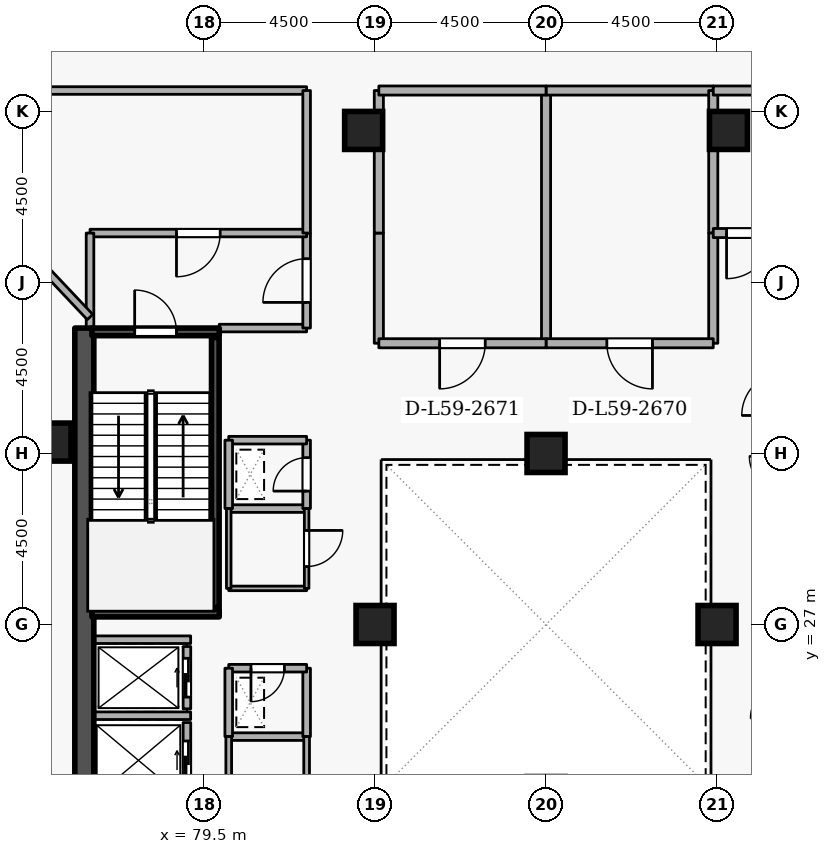
"""IFC4 building model, lengths in metres.
Left out: names, types, materials, properties, quantities, classifications, styles, units other than length and angle.
Written with IfcOpenShell. Run it as: python <this file> out.ifc"""

import sys

from ifc_helpers import new_model, si_unit, direction, frame, frame_2d, origin, origin_2d, place, context, subcontext, project, spatial, rectangle, extrude, element, fill, save


model = new_model("IFC4")
c1 = context("Model", 3, precision=1e-05, world=origin(), true_north=direction((0.0, 1.0)))
c2 = subcontext(c1, "Body", "Model", "MODEL_VIEW")
j1 = project(units=[si_unit("LENGTHUNIT", "METRE"), si_unit("PLANEANGLEUNIT", "RADIAN")], contexts=[c1])
p1 = place(None, origin())
s1 = spatial("IfcSite", under=j1, at=p1, CompositionType="ELEMENT")
p2 = place(p1, origin())
s2 = spatial("IfcBuilding", under=s1, at=p2, CompositionType="ELEMENT")
p3 = place(p2, frame((0.0, 0.0, 221.7)))
s3 = spatial("IfcBuildingStorey", under=s2, at=p3, CompositionType="ELEMENT", Elevation=221.7)
p4 = place(p3, frame((76.35, 19.2, 0.0), z_axis=(0.0, 0.0, 1.0), x_axis=(0.0, 1.0, 0.0)))
e1 = element("IfcWall", 1, at=p4, inside=s3, PredefinedType="SHEAR", context=c2, shape_type="SweptSolid", body=[
    extrude(rectangle(XDim=15.6, YDim=0.5, at=frame_2d((7.8, 0.0))), origin(), (0.0, 0.0, 1.0), 4.2),
])
for number, where, z_axis, x_axis in (
    (2, (93.3, 40.0, 0.0), (0.0, 0.0, 1.0), (1.0, 0.0, 0.0)),
    (3, (83.7, 40.0, 0.0), (0.0, 0.0, 1.0), (1.0, 0.0, 0.0)),
    (4, (75.5, 31.8, 0.0), (0.0, 0.0, 1.0), (1.0, 0.0, 0.0)),
    (5, (93.0, 27.0, 0.0), (0.0, 0.0, 1.0), (1.0, 0.0, 0.0)),
    (6, (84.0, 27.0, 0.0), (0.0, 0.0, 1.0), (1.0, 0.0, 0.0)),
    (7, (88.5, 31.5, 0.0), (0.0, 0.0, 1.0), (1.0, 0.0, 0.0)),
):
    element("IfcColumn", number, at=place(p3, frame(where, z_axis=z_axis, x_axis=x_axis)), inside=s3, PredefinedType="COLUMN", context=c2, shape_type="SweptSolid", body=[
        extrude(rectangle(XDim=1.0, YDim=1.0, at=origin_2d()), origin(), (0.0, 0.0, 1.0), 4.2),
    ])
p5 = place(p3, frame((79.05, 24.78, 0.0), z_axis=(0.0, 0.0, 1.0), x_axis=(0.0, 1.0, 0.0)))
e8 = element("IfcWall", 8, at=p5, inside=s3, PredefinedType="STANDARD", context=c2, shape_type="SweptSolid", body=[
    extrude(rectangle(XDim=1.64, YDim=0.2, at=frame_2d((0.82, 0.0))), origin(), (0.0, 0.0, 1.0), 3.94),
])
p6 = place(p5, frame((0.31, 0.0, 0.0)))
e9 = element("IfcOpeningElement", 9, at=p6, cuts=e8, PredefinedType="OPENING", context=c2, shape_type="SweptSolid", body=[
    extrude(rectangle(XDim=1.02, YDim=2.06, at=frame_2d((0.51, 1.03))), frame((0.0, 0.11, 0.0), z_axis=(0.0, -1.0, 0.0), x_axis=(1.0, 0.0, 0.0)), (0.0, 0.0, 1.0), 0.22),
])
p7 = place(p3, frame((79.05, 22.43, 0.0), z_axis=(0.0, 0.0, 1.0), x_axis=(0.0, 1.0, 0.0)))
e10 = element("IfcWall", 10, at=p7, inside=s3, PredefinedType="STANDARD", context=c2, shape_type="SweptSolid", body=[
    extrude(rectangle(XDim=1.99, YDim=0.2, at=frame_2d((0.995, 0.0))), origin(), (0.0, 0.0, 1.0), 3.94),
])
p8 = place(p7, frame((0.485, 0.0, 0.0)))
e11 = element("IfcOpeningElement", 11, at=p8, cuts=e10, PredefinedType="OPENING", context=c2, shape_type="SweptSolid", body=[
    extrude(rectangle(XDim=1.02, YDim=2.06, at=frame_2d((0.51, 1.03))), frame((0.0, 0.11, 0.0), z_axis=(0.0, -1.0, 0.0), x_axis=(1.0, 0.0, 0.0)), (0.0, 0.0, 1.0), 0.22),
])
for number, where, z_axis, x_axis in (
    (12, (76.612, 26.6, 0.0), (0.0, 0.0, 1.0), (1.0, 0.0, 0.0)),
    (13, (76.612, 24.6, 0.0), (0.0, 0.0, 1.0), (1.0, 0.0, 0.0)),
):
    element("IfcWall", number, at=place(p3, frame(where, z_axis=z_axis, x_axis=x_axis)), inside=s3, PredefinedType="STANDARD", context=c2, shape_type="SweptSolid", body=[
        extrude(rectangle(XDim=2.536, YDim=0.2, at=frame_2d((1.268, 0.0))), origin(), (0.0, 0.0, 1.0), 3.94),
    ])
p9 = place(p3, frame((76.55, 34.7, 0.0), z_axis=(0.0, 0.0, 1.0), x_axis=(1.0, 0.0, 0.0)))
e14 = element("IfcWall", 14, at=p9, inside=s3, PredefinedType="SHEAR", context=c2, shape_type="SweptSolid", body=[
    extrude(rectangle(XDim=3.35, YDim=0.2, at=frame_2d((1.675, 0.0))), origin(), (0.0, 0.0, 1.0), 4.2),
])
p10 = place(p9, frame((1.125, 0.0, 0.0)))
e15 = element("IfcOpeningElement", 15, at=p10, cuts=e14, PredefinedType="OPENING", context=c2, shape_type="SweptSolid", body=[
    extrude(rectangle(XDim=1.1, YDim=2.1, at=frame_2d((0.55, 1.05))), frame((0.0, 0.11, 0.0), z_axis=(0.0, -1.0, 0.0), x_axis=(1.0, 0.0, 0.0)), (0.0, 0.0, 1.0), 0.22),
])
p11 = place(p3, frame((79.9, 27.3, 0.0), z_axis=(0.0, 0.0, 1.0), x_axis=(-1.0, 0.0, 0.0)))
e16 = element("IfcWall", 16, at=p11, inside=s3, PredefinedType="SHEAR", context=c2, shape_type="SweptSolid", body=[
    extrude(rectangle(XDim=3.35, YDim=0.2, at=frame_2d((1.675, 0.0))), origin(), (0.0, 0.0, 1.0), 4.2),
])
p12 = place(p3, frame((79.797, 27.45, 0.0), z_axis=(0.0, 0.0, 1.0), x_axis=(0.0, 1.0, 0.0)))
e17 = element("IfcWall", 17, at=p12, inside=s3, PredefinedType="SHEAR", context=c2, shape_type="SweptSolid", body=[
    extrude(rectangle(XDim=7.1, YDim=0.2, at=frame_2d((3.55, 0.0))), origin(), (0.0, 0.0, 1.0), 4.2),
])
p13 = place(p3, frame((79.9, 34.8, 0.0), z_axis=(0.0, 0.0, 1.0), x_axis=(1.0, 0.0, 0.0)))
e18 = element("IfcWall", 18, at=p13, inside=s3, PredefinedType="STANDARD", context=c2, shape_type="SweptSolid", body=[
    extrude(rectangle(XDim=2.3, YDim=0.2, at=frame_2d((1.15, 0.0))), origin(), (0.0, 0.0, 1.0), 3.145),
])
p14 = place(p3, frame((82.2, 34.8, 0.0), z_axis=(0.0, 0.0, 1.0), x_axis=(0.0, 1.0, 0.0)))
e19 = element("IfcWall", 19, at=p14, inside=s3, PredefinedType="STANDARD", context=c2, shape_type="SweptSolid", body=[
    extrude(rectangle(XDim=2.5, YDim=0.2, at=frame_2d((1.25, 0.0))), origin(), (0.0, 0.0, 1.0), 3.94),
])
p15 = place(p14, frame((0.675, 0.0, 0.0)))
e20 = element("IfcOpeningElement", 20, at=p15, cuts=e19, PredefinedType="OPENING", context=c2, shape_type="SweptSolid", body=[
    extrude(rectangle(XDim=1.15, YDim=2.1, at=frame_2d((0.575, 1.05))), frame((0.0, 0.11, 0.0), z_axis=(0.0, -1.0, 0.0), x_axis=(1.0, 0.0, 0.0)), (0.0, 0.0, 1.0), 0.22),
])
p16 = place(p3, frame((82.2, 37.3, 0.0), z_axis=(0.0, 0.0, 1.0), x_axis=(-1.0, 0.0, 0.0)))
e21 = element("IfcWall", 21, at=p16, inside=s3, PredefinedType="STANDARD", context=c2, shape_type="SweptSolid", body=[
    extrude(rectangle(XDim=5.7, YDim=0.2, at=frame_2d((2.85, 0.0))), origin(), (0.0, 0.0, 1.0), 3.94),
])
p17 = place(p16, frame((2.275, 0.0, 0.0)))
e22 = element("IfcOpeningElement", 22, at=p17, cuts=e21, PredefinedType="OPENING", context=c2, shape_type="SweptSolid", body=[
    extrude(rectangle(XDim=1.15, YDim=2.1, at=frame_2d((0.575, 1.05))), frame((0.0, 0.11, 0.0), z_axis=(0.0, -1.0, 0.0), x_axis=(1.0, 0.0, 0.0)), (0.0, 0.0, 1.0), 0.22),
])
p18 = place(p3, frame((76.5, 37.3, 0.0), z_axis=(0.0, 0.0, 1.0), x_axis=(0.0, -1.0, 0.0)))
e23 = element("IfcWall", 23, at=p18, inside=s3, PredefinedType="STANDARD", context=c2, shape_type="SweptSolid", body=[
    extrude(rectangle(XDim=2.5, YDim=0.2, at=frame_2d((1.25, 0.0))), origin(), (0.0, 0.0, 1.0), 3.94),
])
p19 = place(p3, frame((80.15, 24.05, 0.0), z_axis=(0.0, 0.0, 1.0), x_axis=(1.0, 0.0, 0.0)))
e24 = element("IfcWall", 24, at=p19, inside=s3, PredefinedType="STANDARD", context=c2, shape_type="SweptSolid", body=[
    extrude(rectangle(XDim=2.05, YDim=0.2, at=frame_2d((1.025, 0.0))), origin(), (0.0, 0.0, 1.0), 3.94),
])
p20 = place(p3, frame((82.2, 24.05, 0.0), z_axis=(0.0, 0.0, 1.0), x_axis=(0.0, 1.0, 0.0)))
e25 = element("IfcWall", 25, at=p20, inside=s3, PredefinedType="STANDARD", context=c2, shape_type="SweptSolid", body=[
    extrude(rectangle(XDim=1.8, YDim=0.2, at=frame_2d((0.9, 0.0))), origin(), (0.0, 0.0, 1.0), 3.94),
])
p21 = place(p3, frame((82.2, 25.85, 0.0), z_axis=(0.0, 0.0, 1.0), x_axis=(-1.0, 0.0, 0.0)))
e26 = element("IfcWall", 26, at=p21, inside=s3, PredefinedType="STANDARD", context=c2, shape_type="SweptSolid", body=[
    extrude(rectangle(XDim=2.05, YDim=0.2, at=frame_2d((1.025, 0.0))), origin(), (0.0, 0.0, 1.0), 3.94),
])
p22 = place(p21, frame((0.585, 0.0, 0.0)))
e27 = element("IfcOpeningElement", 27, at=p22, cuts=e26, PredefinedType="OPENING", context=c2, shape_type="SweptSolid", body=[
    extrude(rectangle(XDim=0.88, YDim=2.04, at=frame_2d((0.44, 1.02))), frame((0.0, 0.11, 0.0), z_axis=(0.0, -1.0, 0.0), x_axis=(1.0, 0.0, 0.0)), (0.0, 0.0, 1.0), 0.22),
])
p23 = place(p3, frame((80.15, 25.85, 0.0), z_axis=(0.0, 0.0, 1.0), x_axis=(0.0, -1.0, 0.0)))
e28 = element("IfcWall", 28, at=p23, inside=s3, PredefinedType="STANDARD", context=c2, shape_type="SweptSolid", body=[
    extrude(rectangle(XDim=1.8, YDim=0.2, at=frame_2d((0.9, 0.0))), origin(), (0.0, 0.0, 1.0), 3.94),
])
p24 = place(p3, frame((80.15, 30.05, 0.0), z_axis=(0.0, 0.0, 1.0), x_axis=(1.0, 0.0, 0.0)))
e29 = element("IfcWall", 29, at=p24, inside=s3, PredefinedType="STANDARD", context=c2, shape_type="SweptSolid", body=[
    extrude(rectangle(XDim=2.05, YDim=0.2, at=frame_2d((1.025, 0.0))), origin(), (0.0, 0.0, 1.0), 3.94),
])
p25 = place(p3, frame((82.2, 30.05, 0.0), z_axis=(0.0, 0.0, 1.0), x_axis=(0.0, 1.0, 0.0)))
e30 = element("IfcWall", 30, at=p25, inside=s3, PredefinedType="STANDARD", context=c2, shape_type="SweptSolid", body=[
    extrude(rectangle(XDim=1.8, YDim=0.2, at=frame_2d((0.9, 0.0))), origin(), (0.0, 0.0, 1.0), 3.94),
])
p26 = place(p25, frame((0.46, 0.0, 0.0)))
e31 = element("IfcOpeningElement", 31, at=p26, cuts=e30, PredefinedType="OPENING", context=c2, shape_type="SweptSolid", body=[
    extrude(rectangle(XDim=0.88, YDim=2.04, at=frame_2d((0.44, 1.02))), frame((0.0, 0.11, 0.0), z_axis=(0.0, -1.0, 0.0), x_axis=(1.0, 0.0, 0.0)), (0.0, 0.0, 1.0), 0.22),
])
p27 = place(p3, frame((82.2, 31.85, 0.0), z_axis=(0.0, 0.0, 1.0), x_axis=(-1.0, 0.0, 0.0)))
e32 = element("IfcWall", 32, at=p27, inside=s3, PredefinedType="STANDARD", context=c2, shape_type="SweptSolid", body=[
    extrude(rectangle(XDim=2.05, YDim=0.2, at=frame_2d((1.025, 0.0))), origin(), (0.0, 0.0, 1.0), 3.94),
])
p28 = place(p3, frame((80.15, 31.85, 0.0), z_axis=(0.0, 0.0, 1.0), x_axis=(0.0, -1.0, 0.0)))
e33 = element("IfcWall", 33, at=p28, inside=s3, PredefinedType="STANDARD", context=c2, shape_type="SweptSolid", body=[
    extrude(rectangle(XDim=1.8, YDim=0.2, at=frame_2d((0.9, 0.0))), origin(), (0.0, 0.0, 1.0), 3.94),
])
p29 = place(p3, frame((88.5, 34.4, 0.0), z_axis=(0.0, 0.0, 1.0), x_axis=(0.0, 1.0, 0.0)))
e34 = element("IfcWall", 34, at=p29, inside=s3, PredefinedType="STANDARD", context=c2, shape_type="SweptSolid", body=[
    extrude(rectangle(XDim=6.65, YDim=0.24, at=frame_2d((3.325, 0.0))), origin(), (0.0, 0.0, 1.0), 3.325),
])
p30 = place(p3, frame((88.5, 41.05, 0.0), z_axis=(0.0, 0.0, 1.0), x_axis=(1.0, 0.0, 0.0)))
e35 = element("IfcWall", 35, at=p30, inside=s3, PredefinedType="STANDARD", context=c2, shape_type="SweptSolid", body=[
    extrude(rectangle(XDim=4.4, YDim=0.24, at=frame_2d((2.2, 0.0))), origin(), (0.0, 0.0, 1.0), 3.94),
])
p31 = place(p3, frame((92.9, 41.05, 0.0), z_axis=(0.0, 0.0, 1.0), x_axis=(0.0, -1.0, 0.0)))
e36 = element("IfcWall", 36, at=p31, inside=s3, PredefinedType="STANDARD", context=c2, shape_type="SweptSolid", body=[
    extrude(rectangle(XDim=3.75, YDim=0.24, at=frame_2d((1.875, 0.0))), origin(), (0.0, 0.0, 1.0), 3.94),
])
p32 = place(p3, frame((92.9, 37.3, 0.0), z_axis=(0.0, 0.0, 1.0), x_axis=(0.0, -1.0, 0.0)))
e37 = element("IfcWall", 37, at=p32, inside=s3, PredefinedType="STANDARD", context=c2, shape_type="SweptSolid", body=[
    extrude(rectangle(XDim=2.9, YDim=0.24, at=frame_2d((1.45, 0.0))), origin(), (0.0, 0.0, 1.0), 3.94),
])
p33 = place(p3, frame((92.9, 34.4, 0.0), z_axis=(0.0, 0.0, 1.0), x_axis=(-1.0, 0.0, 0.0)))
e38 = element("IfcWall", 38, at=p33, inside=s3, PredefinedType="STANDARD", context=c2, shape_type="SweptSolid", body=[
    extrude(rectangle(XDim=4.4, YDim=0.24, at=frame_2d((2.2, 0.0))), origin(), (0.0, 0.0, 1.0), 3.145),
])
p34 = place(p33, frame((1.6, 0.0, 0.0)))
e39 = element("IfcOpeningElement", 39, at=p34, cuts=e38, PredefinedType="OPENING", context=c2, shape_type="SweptSolid", body=[
    extrude(rectangle(XDim=1.2, YDim=2.1, at=frame_2d((0.6, 1.05))), frame((0.0, 0.13, 0.0), z_axis=(0.0, -1.0, 0.0), x_axis=(1.0, 0.0, 0.0)), (0.0, 0.0, 1.0), 0.26),
])
p35 = place(p3, frame((84.1, 34.4, 0.0), z_axis=(0.0, 0.0, 1.0), x_axis=(0.0, 1.0, 0.0)))
e40 = element("IfcWall", 40, at=p35, inside=s3, PredefinedType="STANDARD", context=c2, shape_type="SweptSolid", body=[
    extrude(rectangle(XDim=2.9, YDim=0.24, at=frame_2d((1.45, 0.0))), origin(), (0.0, 0.0, 1.0), 3.94),
])
p36 = place(p3, frame((84.1, 37.3, 0.0), z_axis=(0.0, 0.0, 1.0), x_axis=(0.0, 1.0, 0.0)))
e41 = element("IfcWall", 41, at=p36, inside=s3, PredefinedType="STANDARD", context=c2, shape_type="SweptSolid", body=[
    extrude(rectangle(XDim=3.75, YDim=0.24, at=frame_2d((1.875, 0.0))), origin(), (0.0, 0.0, 1.0), 3.94),
])
p37 = place(p3, frame((84.1, 41.05, 0.0), z_axis=(0.0, 0.0, 1.0), x_axis=(1.0, 0.0, 0.0)))
e42 = element("IfcWall", 42, at=p37, inside=s3, PredefinedType="STANDARD", context=c2, shape_type="SweptSolid", body=[
    extrude(rectangle(XDim=4.4, YDim=0.24, at=frame_2d((2.2, 0.0))), origin(), (0.0, 0.0, 1.0), 3.94),
])
p38 = place(p3, frame((88.5, 34.4, 0.0), z_axis=(0.0, 0.0, 1.0), x_axis=(-1.0, 0.0, 0.0)))
e43 = element("IfcWall", 43, at=p38, inside=s3, PredefinedType="STANDARD", context=c2, shape_type="SweptSolid", body=[
    extrude(rectangle(XDim=4.4, YDim=0.24, at=frame_2d((2.2, 0.0))), origin(), (0.0, 0.0, 1.0), 3.145),
])
p39 = place(p38, frame((1.6, 0.0, 0.0)))
e44 = element("IfcOpeningElement", 44, at=p39, cuts=e43, PredefinedType="OPENING", context=c2, shape_type="SweptSolid", body=[
    extrude(rectangle(XDim=1.2, YDim=2.1, at=frame_2d((0.6, 1.05))), frame((0.0, 0.13, 0.0), z_axis=(0.0, -1.0, 0.0), x_axis=(1.0, 0.0, 0.0)), (0.0, 0.0, 1.0), 0.26),
])
p40 = place(p3, frame((76.5, 35.09, 0.0), z_axis=(0.0, 0.0, 1.0), x_axis=(-0.686815846926, 0.72683147456, 0.0)))
e45 = element("IfcWall", 45, at=p40, inside=s3, PredefinedType="STANDARD", context=c2, shape_type="SweptSolid", body=[
    extrude(rectangle(XDim=8.2, YDim=0.2, at=frame_2d((4.1, 0.0))), origin(), (0.0, 0.0, 1.0), 3.94),
])
p41 = place(p3, frame((70.868, 41.05, 0.0), z_axis=(0.0, 0.0, 1.0), x_axis=(1.0, 0.0, 0.0)))
e46 = element("IfcWall", 46, at=p41, inside=s3, PredefinedType="STANDARD", context=c2, shape_type="SweptSolid", body=[
    extrude(rectangle(XDim=11.332, YDim=0.2, at=frame_2d((5.666, 0.0))), origin(), (0.0, 0.0, 1.0), 3.94),
])
p42 = place(p3, frame((82.2, 41.05, 0.0), z_axis=(0.0, 0.0, 1.0), x_axis=(0.0, -1.0, 0.0)))
e47 = element("IfcWall", 47, at=p42, inside=s3, PredefinedType="STANDARD", context=c2, shape_type="SweptSolid", body=[
    extrude(rectangle(XDim=3.75, YDim=0.2, at=frame_2d((1.875, 0.0))), origin(), (0.0, 0.0, 1.0), 3.94),
])
p43 = place(p3, frame((94.8, 37.3, 0.0), z_axis=(0.0, 0.0, 1.0), x_axis=(-1.0, 0.0, 0.0)))
e48 = element("IfcWall", 48, at=p43, inside=s3, PredefinedType="STANDARD", context=c2, shape_type="SweptSolid", body=[
    extrude(rectangle(XDim=1.9, YDim=0.24, at=frame_2d((0.95, 0.0))), origin(), (0.0, 0.0, 1.0), 3.94),
])
p44 = place(p43, frame((0.35, 0.0, 0.0)))
e49 = element("IfcOpeningElement", 49, at=p44, cuts=e48, PredefinedType="OPENING", context=c2, shape_type="SweptSolid", body=[
    extrude(rectangle(XDim=1.2, YDim=2.1, at=frame_2d((0.6, 1.05))), frame((0.0, 0.13, 0.0), z_axis=(0.0, -1.0, 0.0), x_axis=(1.0, 0.0, 0.0)), (0.0, 0.0, 1.0), 0.26),
])
p45 = place(p3, frame((92.9, 41.05, 0.0), z_axis=(0.0, 0.0, 1.0), x_axis=(1.0, 0.0, 0.0)))
e50 = element("IfcWall", 50, at=p45, inside=s3, PredefinedType="STANDARD", context=c2, shape_type="SweptSolid", body=[
    extrude(rectangle(XDim=7.4, YDim=0.24, at=frame_2d((3.7, 0.0))), origin(), (0.0, 0.0, 1.0), 3.94),
])
p46 = place(p3, frame((80.15, 19.8, 0.0), z_axis=(0.0, 0.0, 1.0), x_axis=(0.0, 1.0, 0.0)))
e51 = element("IfcWall", 51, at=p46, inside=s3, PredefinedType="PARTITIONING", context=c2, shape_type="SweptSolid", body=[
    extrude(rectangle(XDim=4.25, YDim=0.15, at=frame_2d((2.125, 0.0))), origin(), (0.0, 0.0, 1.0), 3.94),
])
p47 = place(p3, frame((82.2, 24.05, 0.0), z_axis=(0.0, 0.0, 1.0), x_axis=(0.0, -1.0, 0.0)))
e52 = element("IfcWall", 52, at=p47, inside=s3, PredefinedType="PARTITIONING", context=c2, shape_type="SweptSolid", body=[
    extrude(rectangle(XDim=4.25, YDim=0.15, at=frame_2d((2.125, 0.0))), origin(), (0.0, 0.0, 1.0), 3.94),
])
p48 = place(p47, frame((1.665, 0.0, 0.0)))
e53 = element("IfcOpeningElement", 53, at=p48, cuts=e52, PredefinedType="OPENING", context=c2, shape_type="SweptSolid", body=[
    extrude(rectangle(XDim=0.92, YDim=2.08, at=frame_2d((0.46, 1.04))), frame((0.0, 0.085, 0.0), z_axis=(0.0, -1.0, 0.0), x_axis=(1.0, 0.0, 0.0)), (0.0, 0.0, 1.0), 0.17),
])
p49 = place(p3, frame((82.2, 27.95, 0.0), z_axis=(0.0, 0.0, 1.0), x_axis=(-1.0, 0.0, 0.0)))
e54 = element("IfcWall", 54, at=p49, inside=s3, PredefinedType="PARTITIONING", context=c2, shape_type="SweptSolid", body=[
    extrude(rectangle(XDim=2.05, YDim=0.12, at=frame_2d((1.025, 0.0))), origin(), (0.0, 0.0, 1.0), 3.94),
])
p50 = place(p3, frame((80.15, 27.95, 0.0), z_axis=(0.0, 0.0, 1.0), x_axis=(0.0, 1.0, 0.0)))
e55 = element("IfcWall", 55, at=p50, inside=s3, PredefinedType="PARTITIONING", context=c2, shape_type="SweptSolid", body=[
    extrude(rectangle(XDim=2.1, YDim=0.12, at=frame_2d((1.05, 0.0))), origin(), (0.0, 0.0, 1.0), 3.94),
])
p51 = place(p3, frame((82.2, 30.05, 0.0), z_axis=(0.0, 0.0, 1.0), x_axis=(0.0, -1.0, 0.0)))
e56 = element("IfcWall", 56, at=p51, inside=s3, PredefinedType="PARTITIONING", context=c2, shape_type="SweptSolid", body=[
    extrude(rectangle(XDim=2.1, YDim=0.12, at=frame_2d((1.05, 0.0))), origin(), (0.0, 0.0, 1.0), 3.94),
])
p52 = place(p51, frame((0.575, 0.0, 0.0)))
e57 = element("IfcOpeningElement", 57, at=p52, cuts=e56, PredefinedType="OPENING", context=c2, shape_type="SweptSolid", body=[
    extrude(rectangle(XDim=0.95, YDim=2.1, at=frame_2d((0.475, 1.05))), frame((0.0, 0.07, 0.0), z_axis=(0.0, -1.0, 0.0), x_axis=(1.0, 0.0, 0.0)), (0.0, 0.0, 1.0), 0.14),
])
p53 = place(p6, origin())
e58 = element("IfcDoor", 58, at=p53, inside=s3, OperationType="SLIDING_TO_LEFT", PredefinedType="DOOR", context=c2, shape_type="SweptSolid", body=[
    extrude(rectangle(XDim=1.02, YDim=2.06, at=frame_2d((0.51, 1.03))), frame((0.0, 0.025, 0.0), z_axis=(0.0, -1.0, 0.0), x_axis=(1.0, 0.0, 0.0)), (0.0, 0.0, 1.0), 0.05),
])
fill(e9, e58)
p54 = place(p8, origin())
e59 = element("IfcDoor", 59, at=p54, inside=s3, OperationType="SLIDING_TO_LEFT", PredefinedType="DOOR", context=c2, shape_type="SweptSolid", body=[
    extrude(rectangle(XDim=1.02, YDim=2.06, at=frame_2d((0.51, 1.03))), frame((0.0, 0.025, 0.0), z_axis=(0.0, -1.0, 0.0), x_axis=(1.0, 0.0, 0.0)), (0.0, 0.0, 1.0), 0.05),
])
fill(e11, e59)
p55 = place(p10, origin())
e60 = element("IfcDoor", 60, at=p55, inside=s3, OperationType="SINGLE_SWING_LEFT", PredefinedType="DOOR", context=c2, shape_type="SweptSolid", body=[
    extrude(rectangle(XDim=1.1, YDim=2.1, at=frame_2d((0.55, 1.05))), frame((0.0, 0.025, 0.0), z_axis=(0.0, -1.0, 0.0), x_axis=(1.0, 0.0, 0.0)), (0.0, 0.0, 1.0), 0.05),
])
fill(e15, e60)
p56 = place(p15, origin())
e61 = element("IfcDoor", 61, at=p56, inside=s3, OperationType="SINGLE_SWING_LEFT", PredefinedType="DOOR", context=c2, shape_type="SweptSolid", body=[
    extrude(rectangle(XDim=1.15, YDim=2.1, at=frame_2d((0.575, 1.05))), frame((0.0, 0.025, 0.0), z_axis=(0.0, -1.0, 0.0), x_axis=(1.0, 0.0, 0.0)), (0.0, 0.0, 1.0), 0.05),
])
fill(e20, e61)
p57 = place(p22, origin())
e62 = element("IfcDoor", 62, at=p57, inside=s3, OperationType="SINGLE_SWING_RIGHT", PredefinedType="DOOR", context=c2, shape_type="SweptSolid", body=[
    extrude(rectangle(XDim=0.88, YDim=2.04, at=frame_2d((0.44, 1.02))), frame((0.0, 0.025, 0.0), z_axis=(0.0, -1.0, 0.0), x_axis=(1.0, 0.0, 0.0)), (0.0, 0.0, 1.0), 0.05),
])
fill(e27, e62)
p58 = place(p26, origin())
e63 = element("IfcDoor", 63, at=p58, inside=s3, OperationType="SINGLE_SWING_LEFT", PredefinedType="DOOR", context=c2, shape_type="SweptSolid", body=[
    extrude(rectangle(XDim=0.88, YDim=2.04, at=frame_2d((0.44, 1.02))), frame((0.0, 0.025, 0.0), z_axis=(0.0, -1.0, 0.0), x_axis=(1.0, 0.0, 0.0)), (0.0, 0.0, 1.0), 0.05),
])
fill(e31, e63)
p59 = place(p52, origin())
e64 = element("IfcDoor", 64, at=p59, inside=s3, OperationType="SINGLE_SWING_LEFT", PredefinedType="DOOR", context=c2, shape_type="SweptSolid", body=[
    extrude(rectangle(XDim=0.95, YDim=2.1, at=frame_2d((0.475, 1.05))), frame((0.0, 0.025, 0.0), z_axis=(0.0, -1.0, 0.0), x_axis=(1.0, 0.0, 0.0)), (0.0, 0.0, 1.0), 0.05),
])
fill(e57, e64)
p60 = place(p34, origin())
e65 = element("IfcDoor", 65, at=p60, inside=s3, OperationType="SINGLE_SWING_LEFT", PredefinedType="DOOR", context=c2, shape_type="SweptSolid", body=[
    extrude(rectangle(XDim=1.2, YDim=2.1, at=frame_2d((0.6, 1.05))), frame((0.0, 0.025, 0.0), z_axis=(0.0, -1.0, 0.0), x_axis=(1.0, 0.0, 0.0)), (0.0, 0.0, 1.0), 0.05),
])
fill(e39, e65)
p61 = place(p39, origin())
e66 = element("IfcDoor", 66, at=p61, inside=s3, OperationType="SINGLE_SWING_RIGHT", PredefinedType="DOOR", context=c2, shape_type="SweptSolid", body=[
    extrude(rectangle(XDim=1.2, YDim=2.1, at=frame_2d((0.6, 1.05))), frame((0.0, 0.025, 0.0), z_axis=(0.0, -1.0, 0.0), x_axis=(1.0, 0.0, 0.0)), (0.0, 0.0, 1.0), 0.05),
])
fill(e44, e66)
p62 = place(p17, origin())
e67 = element("IfcDoor", 67, at=p62, inside=s3, OperationType="SINGLE_SWING_RIGHT", PredefinedType="DOOR", context=c2, shape_type="SweptSolid", body=[
    extrude(rectangle(XDim=1.15, YDim=2.1, at=frame_2d((0.575, 1.05))), frame((0.0, 0.025, 0.0), z_axis=(0.0, -1.0, 0.0), x_axis=(1.0, 0.0, 0.0)), (0.0, 0.0, 1.0), 0.05),
])
fill(e22, e67)
p63 = place(p44, origin())
e68 = element("IfcDoor", 68, at=p63, inside=s3, OperationType="SINGLE_SWING_RIGHT", PredefinedType="DOOR", context=c2, shape_type="SweptSolid", body=[
    extrude(rectangle(XDim=1.2, YDim=2.1, at=frame_2d((0.6, 1.05))), frame((0.0, 0.025, 0.0), z_axis=(0.0, -1.0, 0.0), x_axis=(1.0, 0.0, 0.0)), (0.0, 0.0, 1.0), 0.05),
])
fill(e49, e68)
save(model, sys.argv[1])
